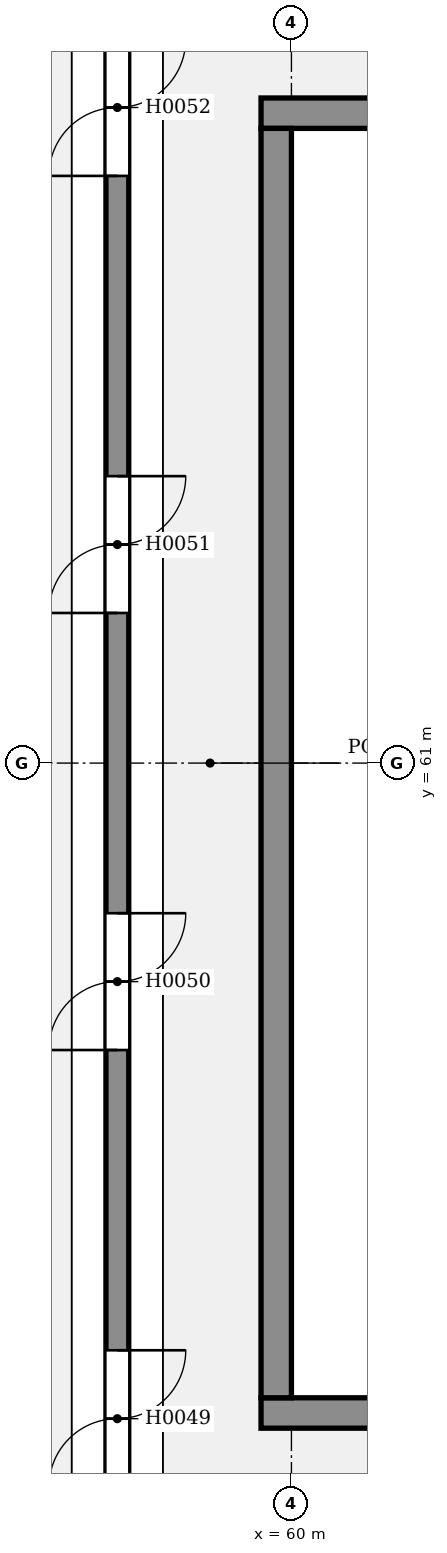
"""IFC4 building model, lengths in metres.
Left out: names, types, materials, properties, quantities, classifications, styles, units other than length and angle.
Written with IfcOpenShell. Run it as: python <this file> out.ifc"""

import sys

from ifc_helpers import new_model, si_unit, direction, frame, frame_2d, origin, place, context, subcontext, project, spatial, rectangle, extrude, element, fill, save


model = new_model("IFC4")
c1 = context("Model", 3, precision=1e-05, world=origin(), true_north=direction((0.0, 1.0)))
c2 = subcontext(c1, "Body", "Model", "MODEL_VIEW")
j1 = project(units=[si_unit("LENGTHUNIT", "METRE"), si_unit("PLANEANGLEUNIT", "RADIAN")], contexts=[c1])
p1 = place(None, origin())
s1 = spatial("IfcSite", under=j1, at=p1, CompositionType="ELEMENT")
p2 = place(p1, origin())
s2 = spatial("IfcBuilding", under=s1, at=p2, CompositionType="ELEMENT")
p3 = place(p2, origin())
s3 = spatial("IfcBuildingStorey", under=s2, at=p3, CompositionType="ELEMENT", Elevation=0.0)
p4 = place(p3, frame((57.71, 38.0, 0.0), z_axis=(0.0, 0.0, 1.0), x_axis=(0.0, 1.0, 0.0)))
e1 = element("IfcWall", 1, at=p4, inside=s3, PredefinedType="SOLIDWALL", context=c2, shape_type="SweptSolid", body=[
    extrude(rectangle(XDim=46.0, YDim=0.3, at=frame_2d((23.0, 0.0))), origin(), (0.0, 0.0, 1.0), 5.0),
])
p5 = place(p4, frame((1.975, 0.0, 0.0)))
e2 = element("IfcOpeningElement", 2, at=p5, cuts=e1, PredefinedType="OPENING", context=c2, shape_type="SweptSolid", body=[
    extrude(rectangle(XDim=1.8, YDim=2.1, at=frame_2d((0.9, 1.05))), frame((0.0, 0.16, 0.0), z_axis=(0.0, -1.0, 0.0), x_axis=(1.0, 0.0, 0.0)), (0.0, 0.0, 1.0), 0.32),
])
p6 = place(p4, frame((7.725, 0.0, 0.0)))
e3 = element("IfcOpeningElement", 3, at=p6, cuts=e1, PredefinedType="OPENING", context=c2, shape_type="SweptSolid", body=[
    extrude(rectangle(XDim=1.8, YDim=2.1, at=frame_2d((0.9, 1.05))), frame((0.0, 0.16, 0.0), z_axis=(0.0, -1.0, 0.0), x_axis=(1.0, 0.0, 0.0)), (0.0, 0.0, 1.0), 0.32),
])
p7 = place(p4, frame((13.475, 0.0, 0.0)))
e4 = element("IfcOpeningElement", 4, at=p7, cuts=e1, PredefinedType="OPENING", context=c2, shape_type="SweptSolid", body=[
    extrude(rectangle(XDim=1.8, YDim=2.1, at=frame_2d((0.9, 1.05))), frame((0.0, 0.16, 0.0), z_axis=(0.0, -1.0, 0.0), x_axis=(1.0, 0.0, 0.0)), (0.0, 0.0, 1.0), 0.32),
])
p8 = place(p4, frame((19.225, 0.0, 0.0)))
e5 = element("IfcOpeningElement", 5, at=p8, cuts=e1, PredefinedType="OPENING", context=c2, shape_type="SweptSolid", body=[
    extrude(rectangle(XDim=1.8, YDim=2.1, at=frame_2d((0.9, 1.05))), frame((0.0, 0.16, 0.0), z_axis=(0.0, -1.0, 0.0), x_axis=(1.0, 0.0, 0.0)), (0.0, 0.0, 1.0), 0.32),
])
p9 = place(p4, frame((24.975, 0.0, 0.0)))
e6 = element("IfcOpeningElement", 6, at=p9, cuts=e1, PredefinedType="OPENING", context=c2, shape_type="SweptSolid", body=[
    extrude(rectangle(XDim=1.8, YDim=2.1, at=frame_2d((0.9, 1.05))), frame((0.0, 0.16, 0.0), z_axis=(0.0, -1.0, 0.0), x_axis=(1.0, 0.0, 0.0)), (0.0, 0.0, 1.0), 0.32),
])
p10 = place(p4, frame((30.725, 0.0, 0.0)))
e7 = element("IfcOpeningElement", 7, at=p10, cuts=e1, PredefinedType="OPENING", context=c2, shape_type="SweptSolid", body=[
    extrude(rectangle(XDim=1.8, YDim=2.1, at=frame_2d((0.9, 1.05))), frame((0.0, 0.16, 0.0), z_axis=(0.0, -1.0, 0.0), x_axis=(1.0, 0.0, 0.0)), (0.0, 0.0, 1.0), 0.32),
])
p11 = place(p4, frame((36.475, 0.0, 0.0)))
e8 = element("IfcOpeningElement", 8, at=p11, cuts=e1, PredefinedType="OPENING", context=c2, shape_type="SweptSolid", body=[
    extrude(rectangle(XDim=1.8, YDim=2.1, at=frame_2d((0.9, 1.05))), frame((0.0, 0.16, 0.0), z_axis=(0.0, -1.0, 0.0), x_axis=(1.0, 0.0, 0.0)), (0.0, 0.0, 1.0), 0.32),
])
p12 = place(p4, frame((42.225, 0.0, 0.0)))
e9 = element("IfcOpeningElement", 9, at=p12, cuts=e1, PredefinedType="OPENING", context=c2, shape_type="SweptSolid", body=[
    extrude(rectangle(XDim=1.8, YDim=2.1, at=frame_2d((0.9, 1.05))), frame((0.0, 0.16, 0.0), z_axis=(0.0, -1.0, 0.0), x_axis=(1.0, 0.0, 0.0)), (0.0, 0.0, 1.0), 0.32),
])
for number, where, z_axis, x_axis in (
    (10, (59.6, 52.45, -1.8), (0.0, 0.0, 1.0), (1.0, 0.0, 0.0)),
    (11, (59.6, 69.55, -1.8), (0.0, 0.0, 1.0), (1.0, 0.0, 0.0)),
):
    element("IfcWall", number, at=place(p3, frame(where, z_axis=z_axis, x_axis=x_axis)), inside=s3, PredefinedType="SOLIDWALL", context=c2, shape_type="SweptSolid", body=[
        extrude(rectangle(XDim=25.8, YDim=0.4, at=frame_2d((12.9, 0.0))), origin(), (0.0, 0.0, 1.0), 1.55),
    ])
p13 = place(p3, frame((59.8, 52.65, -1.8), z_axis=(0.0, 0.0, 1.0), x_axis=(0.0, 1.0, 0.0)))
e12 = element("IfcWall", 12, at=p13, inside=s3, PredefinedType="SOLIDWALL", context=c2, shape_type="SweptSolid", body=[
    extrude(rectangle(XDim=16.7, YDim=0.4, at=frame_2d((8.35, 0.0))), origin(), (0.0, 0.0, 1.0), 1.55),
])
p14 = place(p7, origin())
e13 = element("IfcDoor", 13, at=p14, inside=s3, OperationType="DOUBLE_DOOR_SINGLE_SWING", PredefinedType="DOOR", context=c2, shape_type="SweptSolid", body=[
    extrude(rectangle(XDim=1.8, YDim=2.1, at=frame_2d((0.9, 1.05))), frame((0.0, 0.025, 0.0), z_axis=(0.0, -1.0, 0.0), x_axis=(1.0, 0.0, 0.0)), (0.0, 0.0, 1.0), 0.05),
])
fill(e4, e13)
p15 = place(p8, origin())
e14 = element("IfcDoor", 14, at=p15, inside=s3, OperationType="DOUBLE_DOOR_SINGLE_SWING", PredefinedType="DOOR", context=c2, shape_type="SweptSolid", body=[
    extrude(rectangle(XDim=1.8, YDim=2.1, at=frame_2d((0.9, 1.05))), frame((0.0, 0.025, 0.0), z_axis=(0.0, -1.0, 0.0), x_axis=(1.0, 0.0, 0.0)), (0.0, 0.0, 1.0), 0.05),
])
fill(e5, e14)
p16 = place(p9, origin())
e15 = element("IfcDoor", 15, at=p16, inside=s3, OperationType="DOUBLE_DOOR_SINGLE_SWING", PredefinedType="DOOR", context=c2, shape_type="SweptSolid", body=[
    extrude(rectangle(XDim=1.8, YDim=2.1, at=frame_2d((0.9, 1.05))), frame((0.0, 0.025, 0.0), z_axis=(0.0, -1.0, 0.0), x_axis=(1.0, 0.0, 0.0)), (0.0, 0.0, 1.0), 0.05),
])
fill(e6, e15)
p17 = place(p10, origin())
e16 = element("IfcDoor", 16, at=p17, inside=s3, OperationType="DOUBLE_DOOR_SINGLE_SWING", PredefinedType="DOOR", context=c2, shape_type="SweptSolid", body=[
    extrude(rectangle(XDim=1.8, YDim=2.1, at=frame_2d((0.9, 1.05))), frame((0.0, 0.025, 0.0), z_axis=(0.0, -1.0, 0.0), x_axis=(1.0, 0.0, 0.0)), (0.0, 0.0, 1.0), 0.05),
])
fill(e7, e16)
save(model, sys.argv[1])
